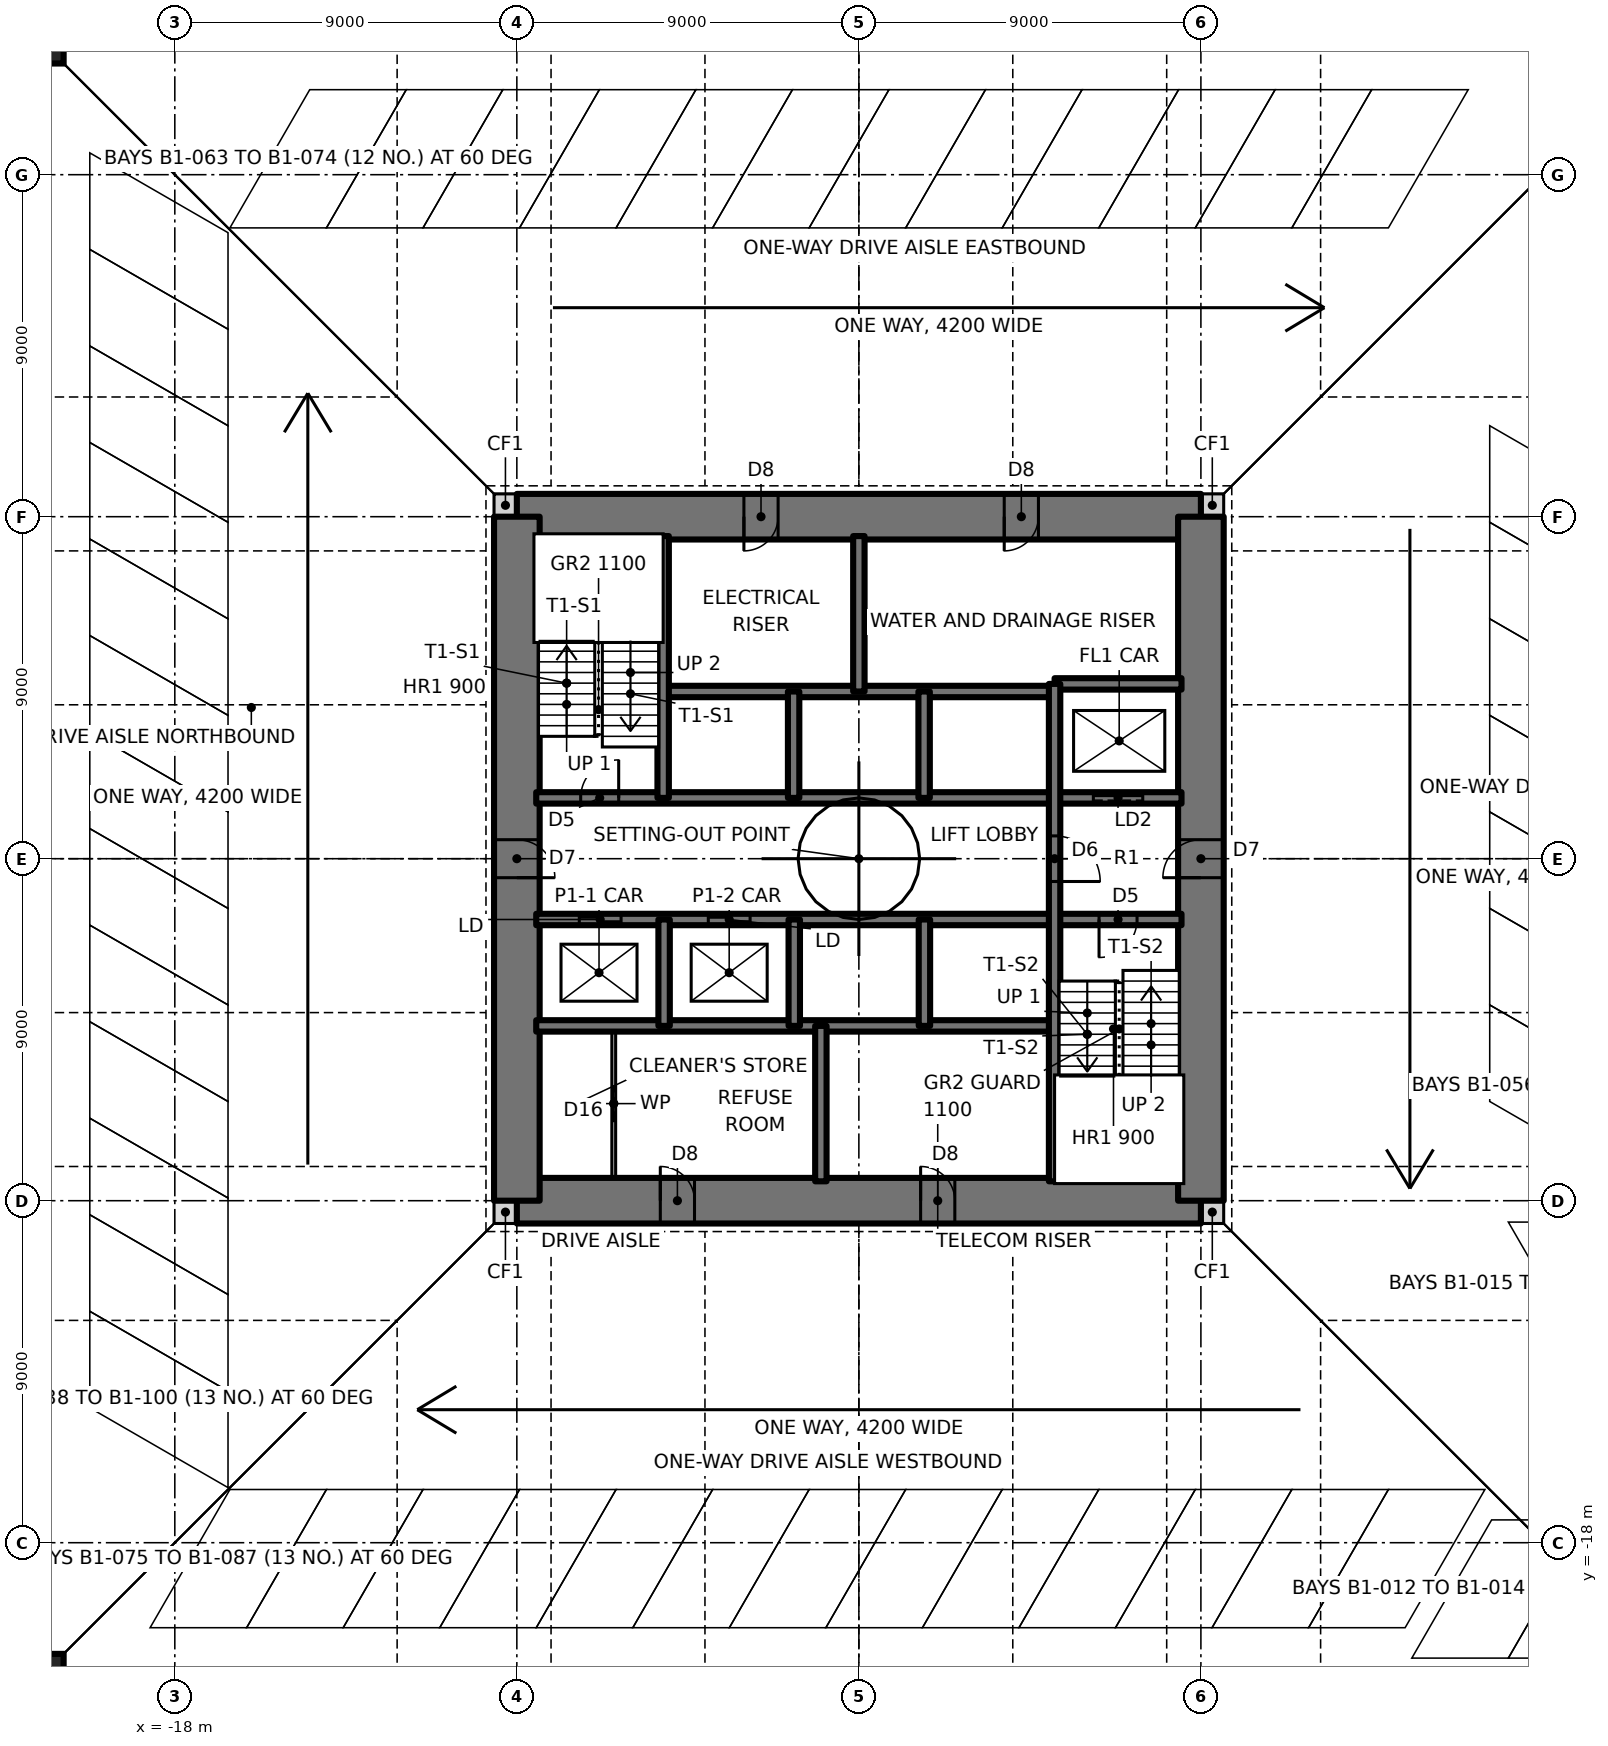
"""IFC4 building model, lengths in metres.
Left out: names, types, materials, properties, quantities, classifications, styles, units other than length and angle.
Written with IfcOpenShell. Run it as: python <this file> out.ifc"""

import sys

from ifc_helpers import new_model, si_unit, direction, frame, frame_2d, origin, origin_2d, place, context, subcontext, project, spatial, rectangle, hollow_rectangle, extrude, element, fill, save


model = new_model("IFC4")
c1 = context("Model", 3, precision=1e-05, world=origin(), true_north=direction((0.0, 1.0)))
c2 = subcontext(c1, "Body", "Model", "MODEL_VIEW")
j1 = project(units=[si_unit("LENGTHUNIT", "METRE"), si_unit("PLANEANGLEUNIT", "RADIAN")], contexts=[c1])
p1 = place(None, origin())
s1 = spatial("IfcSite", under=j1, at=p1, CompositionType="ELEMENT")
p2 = place(p1, origin())
s2 = spatial("IfcBuilding", under=s1, at=p2, CompositionType="ELEMENT")
p3 = place(p2, frame((0.0, 0.0, -3.6)))
s3 = spatial("IfcBuildingStorey", under=s2, at=p3, CompositionType="ELEMENT", Elevation=-3.6)
for number, where, z_axis, x_axis in (
    (1, (-21.326, -21.326, 0.0), (0.0, 0.0, 1.0), (1.0, 0.0, 0.0)),
    (2, (-21.326, 21.326, 0.0), (0.0, 0.0, 1.0), (1.0, 0.0, 0.0)),
):
    element("IfcColumn", number, at=place(p3, frame(where, z_axis=z_axis, x_axis=x_axis)), inside=s3, PredefinedType="COLUMN", context=c2, shape_type="SweptSolid", body=[
        extrude(hollow_rectangle(XDim=0.8, YDim=0.8, WallThickness=0.09, at=origin_2d()), origin(), (0.0, 0.0, 1.0), 3.6),
    ])
for number, where, z_axis, x_axis in (
    (3, (-9.6, -9.3, 0.0), (0.0, 0.0, 1.0), (1.0, 0.0, 0.0)),
    (4, (9.0, -9.3, 0.0), (0.0, 0.0, 1.0), (1.0, 0.0, 0.0)),
    (5, (9.0, 9.3, 0.0), (0.0, 0.0, 1.0), (1.0, 0.0, 0.0)),
    (6, (-9.6, 9.3, 0.0), (0.0, 0.0, 1.0), (1.0, 0.0, 0.0)),
):
    element("IfcWall", number, at=place(p3, frame(where, z_axis=z_axis, x_axis=x_axis)), inside=s3, PredefinedType="SOLIDWALL", context=c2, shape_type="SweptSolid", body=[
        extrude(rectangle(XDim=0.6, YDim=0.6, at=frame_2d((0.3, 0.0))), origin(), (0.0, 0.0, 1.0), 3.6),
    ])
p4 = place(p3, frame((-9.0, -9.0, 0.0), z_axis=(0.0, 0.0, 1.0), x_axis=(1.0, 0.0, 0.0)))
e7 = element("IfcWall", 7, at=p4, inside=s3, PredefinedType="SHEAR", context=c2, shape_type="SweptSolid", body=[
    extrude(rectangle(XDim=18.0, YDim=1.2, at=frame_2d((9.0, 0.0))), origin(), (0.0, 0.0, 1.0), 3.6),
])
p5 = place(p4, frame((3.775, 0.0, 0.0)))
e8 = element("IfcOpeningElement", 8, at=p5, cuts=e7, PredefinedType="OPENING", context=c2, shape_type="SweptSolid", body=[
    extrude(rectangle(XDim=0.9, YDim=2.1, at=frame_2d((0.45, 1.05))), frame((0.0, 0.61, 0.0), z_axis=(0.0, -1.0, 0.0), x_axis=(1.0, 0.0, 0.0)), (0.0, 0.0, 1.0), 1.22),
])
p6 = place(p4, frame((10.625, 0.0, 0.0)))
e9 = element("IfcOpeningElement", 9, at=p6, cuts=e7, PredefinedType="OPENING", context=c2, shape_type="SweptSolid", body=[
    extrude(rectangle(XDim=0.9, YDim=2.1, at=frame_2d((0.45, 1.05))), frame((0.0, 0.61, 0.0), z_axis=(0.0, -1.0, 0.0), x_axis=(1.0, 0.0, 0.0)), (0.0, 0.0, 1.0), 1.22),
])
p7 = place(p3, frame((9.0, 9.0, 0.0), z_axis=(0.0, 0.0, 1.0), x_axis=(-1.0, 0.0, 0.0)))
e10 = element("IfcWall", 10, at=p7, inside=s3, PredefinedType="SHEAR", context=c2, shape_type="SweptSolid", body=[
    extrude(rectangle(XDim=18.0, YDim=1.2, at=frame_2d((9.0, 0.0))), origin(), (0.0, 0.0, 1.0), 3.6),
])
p8 = place(p7, frame((11.125, 0.0, 0.0)))
e11 = element("IfcOpeningElement", 11, at=p8, cuts=e10, PredefinedType="OPENING", context=c2, shape_type="SweptSolid", body=[
    extrude(rectangle(XDim=0.9, YDim=2.1, at=frame_2d((0.45, 1.05))), frame((0.0, 0.61, 0.0), z_axis=(0.0, -1.0, 0.0), x_axis=(1.0, 0.0, 0.0)), (0.0, 0.0, 1.0), 1.22),
])
p9 = place(p7, frame((4.275, 0.0, 0.0)))
e12 = element("IfcOpeningElement", 12, at=p9, cuts=e10, PredefinedType="OPENING", context=c2, shape_type="SweptSolid", body=[
    extrude(rectangle(XDim=0.9, YDim=2.1, at=frame_2d((0.45, 1.05))), frame((0.0, 0.61, 0.0), z_axis=(0.0, -1.0, 0.0), x_axis=(1.0, 0.0, 0.0)), (0.0, 0.0, 1.0), 1.22),
])
p10 = place(p3, frame((9.0, -9.0, 0.0), z_axis=(0.0, 0.0, 1.0), x_axis=(0.0, 1.0, 0.0)))
e13 = element("IfcWall", 13, at=p10, inside=s3, PredefinedType="SHEAR", context=c2, shape_type="SweptSolid", body=[
    extrude(rectangle(XDim=18.0, YDim=1.2, at=frame_2d((9.0, 0.0))), origin(), (0.0, 0.0, 1.0), 3.6),
])
p11 = place(p10, frame((8.5, 0.0, 0.0)))
e14 = element("IfcOpeningElement", 14, at=p11, cuts=e13, PredefinedType="OPENING", context=c2, shape_type="SweptSolid", body=[
    extrude(rectangle(XDim=1.0, YDim=2.1, at=frame_2d((0.5, 1.05))), frame((0.0, 0.61, 0.0), z_axis=(0.0, -1.0, 0.0), x_axis=(1.0, 0.0, 0.0)), (0.0, 0.0, 1.0), 1.22),
])
p12 = place(p3, frame((-9.0, 9.0, 0.0), z_axis=(0.0, 0.0, 1.0), x_axis=(0.0, -1.0, 0.0)))
e15 = element("IfcWall", 15, at=p12, inside=s3, PredefinedType="SHEAR", context=c2, shape_type="SweptSolid", body=[
    extrude(rectangle(XDim=18.0, YDim=1.2, at=frame_2d((9.0, 0.0))), origin(), (0.0, 0.0, 1.0), 3.6),
])
p13 = place(p12, frame((8.5, 0.0, 0.0)))
e16 = element("IfcOpeningElement", 16, at=p13, cuts=e15, PredefinedType="OPENING", context=c2, shape_type="SweptSolid", body=[
    extrude(rectangle(XDim=1.0, YDim=2.1, at=frame_2d((0.5, 1.05))), frame((0.0, 0.61, 0.0), z_axis=(0.0, -1.0, 0.0), x_axis=(1.0, 0.0, 0.0)), (0.0, 0.0, 1.0), 1.22),
])
p14 = place(p3, frame((-8.49, -4.4, 0.0), z_axis=(0.0, 0.0, 1.0), x_axis=(1.0, 0.0, 0.0)))
e17 = element("IfcWall", 17, at=p14, inside=s3, PredefinedType="SOLIDWALL", context=c2, shape_type="SweptSolid", body=[
    extrude(rectangle(XDim=13.64, YDim=0.3, at=frame_2d((6.82, 0.0))), origin(), (0.0, 0.0, 1.0), 3.6),
])
p15 = place(p3, frame((-8.49, -1.6, 0.0), z_axis=(0.0, 0.0, 1.0), x_axis=(1.0, 0.0, 0.0)))
e18 = element("IfcWall", 18, at=p15, inside=s3, PredefinedType="SOLIDWALL", context=c2, shape_type="SweptSolid", body=[
    extrude(rectangle(XDim=16.98, YDim=0.3, at=frame_2d((8.49, 0.0))), origin(), (0.0, 0.0, 1.0), 3.6),
])
p16 = place(p15, frame((14.81, 0.0, 0.0)))
e19 = element("IfcOpeningElement", 19, at=p16, cuts=e18, PredefinedType="OPENING", context=c2, shape_type="SweptSolid", body=[
    extrude(rectangle(XDim=1.0, YDim=2.1, at=frame_2d((0.5, 1.05))), frame((0.0, 0.16, 0.0), z_axis=(0.0, -1.0, 0.0), x_axis=(1.0, 0.0, 0.0)), (0.0, 0.0, 1.0), 0.32),
])
p17 = place(p15, frame((1.133, 0.0, 0.0)))
e20 = element("IfcOpeningElement", 20, at=p17, cuts=e18, PredefinedType="OPENING", context=c2, shape_type="SweptSolid", body=[
    extrude(rectangle(XDim=1.1, YDim=2.1, at=frame_2d((0.55, 1.05))), frame((0.0, 0.16, 0.0), z_axis=(0.0, -1.0, 0.0), x_axis=(1.0, 0.0, 0.0)), (0.0, 0.0, 1.0), 0.32),
])
p18 = place(p15, frame((4.528, 0.0, 0.0)))
e21 = element("IfcOpeningElement", 21, at=p18, cuts=e18, PredefinedType="OPENING", context=c2, shape_type="SweptSolid", body=[
    extrude(rectangle(XDim=1.1, YDim=2.1, at=frame_2d((0.55, 1.05))), frame((0.0, 0.16, 0.0), z_axis=(0.0, -1.0, 0.0), x_axis=(1.0, 0.0, 0.0)), (0.0, 0.0, 1.0), 0.32),
])
p19 = place(p3, frame((-8.49, 1.6, 0.0), z_axis=(0.0, 0.0, 1.0), x_axis=(1.0, 0.0, 0.0)))
e22 = element("IfcWall", 22, at=p19, inside=s3, PredefinedType="SOLIDWALL", context=c2, shape_type="SweptSolid", body=[
    extrude(rectangle(XDim=16.98, YDim=0.3, at=frame_2d((8.49, 0.0))), origin(), (0.0, 0.0, 1.0), 3.6),
])
p20 = place(p19, frame((1.17, 0.0, 0.0)))
e23 = element("IfcOpeningElement", 23, at=p20, cuts=e22, PredefinedType="OPENING", context=c2, shape_type="SweptSolid", body=[
    extrude(rectangle(XDim=1.0, YDim=2.1, at=frame_2d((0.5, 1.05))), frame((0.0, 0.16, 0.0), z_axis=(0.0, -1.0, 0.0), x_axis=(1.0, 0.0, 0.0)), (0.0, 0.0, 1.0), 0.32),
])
p21 = place(p19, frame((14.66, 0.0, 0.0)))
e24 = element("IfcOpeningElement", 24, at=p21, cuts=e22, PredefinedType="OPENING", context=c2, shape_type="SweptSolid", body=[
    extrude(rectangle(XDim=1.3, YDim=2.1, at=frame_2d((0.65, 1.05))), frame((0.0, 0.16, 0.0), z_axis=(0.0, -1.0, 0.0), x_axis=(1.0, 0.0, 0.0)), (0.0, 0.0, 1.0), 0.32),
])
p22 = place(p3, frame((-5.15, 4.4, 0.0), z_axis=(0.0, 0.0, 1.0), x_axis=(1.0, 0.0, 0.0)))
e25 = element("IfcWall", 25, at=p22, inside=s3, PredefinedType="SOLIDWALL", context=c2, shape_type="SweptSolid", body=[
    extrude(rectangle(XDim=10.3, YDim=0.3, at=frame_2d((5.15, 0.0))), origin(), (0.0, 0.0, 1.0), 3.6),
])
p23 = place(p3, frame((5.15, 4.6, 0.0), z_axis=(0.0, 0.0, 1.0), x_axis=(1.0, 0.0, 0.0)))
e26 = element("IfcWall", 26, at=p23, inside=s3, PredefinedType="SOLIDWALL", context=c2, shape_type="SweptSolid", body=[
    extrude(rectangle(XDim=3.34, YDim=0.3, at=frame_2d((1.67, 0.0))), origin(), (0.0, 0.0, 1.0), 3.6),
])
p24 = place(p3, frame((5.15, -8.49, 0.0), z_axis=(0.0, 0.0, 1.0), x_axis=(0.0, 1.0, 0.0)))
e27 = element("IfcWall", 27, at=p24, inside=s3, PredefinedType="SOLIDWALL", context=c2, shape_type="SweptSolid", body=[
    extrude(rectangle(XDim=13.09, YDim=0.3, at=frame_2d((6.545, 0.0))), origin(), (0.0, 0.0, 1.0), 3.6),
])
p25 = place(p24, frame((7.89, 0.0, 0.0)))
e28 = element("IfcOpeningElement", 28, at=p25, cuts=e27, PredefinedType="OPENING", context=c2, shape_type="SweptSolid", body=[
    extrude(rectangle(XDim=1.2, YDim=2.1, at=frame_2d((0.6, 1.05))), frame((0.0, 0.16, 0.0), z_axis=(0.0, -1.0, 0.0), x_axis=(1.0, 0.0, 0.0)), (0.0, 0.0, 1.0), 0.32),
])
for number, where, z_axis, x_axis in (
    (29, (1.725, -4.4, 0.0), (0.0, 0.0, 1.0), (0.0, 1.0, 0.0)),
    (30, (1.717, 1.6, 0.0), (0.0, 0.0, 1.0), (0.0, 1.0, 0.0)),
):
    element("IfcWall", number, at=place(p3, frame(where, z_axis=z_axis, x_axis=x_axis)), inside=s3, PredefinedType="SOLIDWALL", context=c2, shape_type="SweptSolid", body=[
        extrude(rectangle(XDim=2.8, YDim=0.3, at=frame_2d((1.4, 0.0))), origin(), (0.0, 0.0, 1.0), 3.6),
    ])
for number, where, z_axis, x_axis in (
    (31, (0.0, 4.4, 0.0), (0.0, 0.0, 1.0), (0.0, 1.0, 0.0)),
    (32, (-1.0, -8.49, 0.0), (0.0, 0.0, 1.0), (0.0, 1.0, 0.0)),
):
    element("IfcWall", number, at=place(p3, frame(where, z_axis=z_axis, x_axis=x_axis)), inside=s3, PredefinedType="SOLIDWALL", context=c2, shape_type="SweptSolid", body=[
        extrude(rectangle(XDim=4.09, YDim=0.3, at=frame_2d((2.045, 0.0))), origin(), (0.0, 0.0, 1.0), 3.6),
    ])
for number, where, z_axis, x_axis in (
    (33, (-1.7, -4.4, 0.0), (0.0, 0.0, 1.0), (0.0, 1.0, 0.0)),
    (34, (-1.717, 1.6, 0.0), (0.0, 0.0, 1.0), (0.0, 1.0, 0.0)),
    (35, (-5.125, -4.4, 0.0), (0.0, 0.0, 1.0), (0.0, 1.0, 0.0)),
):
    element("IfcWall", number, at=place(p3, frame(where, z_axis=z_axis, x_axis=x_axis)), inside=s3, PredefinedType="SOLIDWALL", context=c2, shape_type="SweptSolid", body=[
        extrude(rectangle(XDim=2.8, YDim=0.3, at=frame_2d((1.4, 0.0))), origin(), (0.0, 0.0, 1.0), 3.6),
    ])
p26 = place(p3, frame((-5.15, 1.6, 0.0), z_axis=(0.0, 0.0, 1.0), x_axis=(0.0, 1.0, 0.0)))
e36 = element("IfcWall", 36, at=p26, inside=s3, PredefinedType="SOLIDWALL", context=c2, shape_type="SweptSolid", body=[
    extrude(rectangle(XDim=6.89, YDim=0.3, at=frame_2d((3.445, 0.0))), origin(), (0.0, 0.0, 1.0), 3.6),
])
p27 = place(p3, frame((-6.45, -8.49, 0.0), z_axis=(0.0, 0.0, 1.0), x_axis=(0.0, 1.0, 0.0)))
e37 = element("IfcWall", 37, at=p27, inside=s3, PredefinedType="PARTITIONING", context=c2, shape_type="SweptSolid", body=[
    extrude(rectangle(XDim=4.09, YDim=0.1, at=frame_2d((2.045, 0.0))), origin(), (0.0, 0.0, 1.0), 3.4),
])
p28 = place(p27, frame((1.595, 0.0, 0.0)))
e38 = element("IfcOpeningElement", 38, at=p28, cuts=e37, PredefinedType="OPENING", context=c2, shape_type="SweptSolid", body=[
    extrude(rectangle(XDim=0.9, YDim=2.1, at=frame_2d((0.45, 1.05))), frame((0.0, 0.06, 0.0), z_axis=(0.0, -1.0, 0.0), x_axis=(1.0, 0.0, 0.0)), (0.0, 0.0, 1.0), 0.12),
])
p29 = place(p20, origin())
e39 = element("IfcDoor", 39, at=p29, inside=s3, OperationType="SINGLE_SWING_RIGHT", PredefinedType="DOOR", context=c2, shape_type="SweptSolid", body=[
    extrude(rectangle(XDim=1.0, YDim=2.1, at=frame_2d((0.5, 1.05))), frame((0.0, 0.025, 0.0), z_axis=(0.0, -1.0, 0.0), x_axis=(1.0, 0.0, 0.0)), (0.0, 0.0, 1.0), 0.05),
])
fill(e23, e39)
p30 = place(p16, frame((1.0, 0.0, 0.0), z_axis=(0.0, 0.0, 1.0), x_axis=(-1.0, 0.0, 0.0)))
e40 = element("IfcDoor", 40, at=p30, inside=s3, OperationType="SINGLE_SWING_RIGHT", PredefinedType="DOOR", context=c2, shape_type="SweptSolid", body=[
    extrude(rectangle(XDim=1.0, YDim=2.1, at=frame_2d((0.5, 1.05))), frame((0.0, 0.025, 0.0), z_axis=(0.0, -1.0, 0.0), x_axis=(1.0, 0.0, 0.0)), (0.0, 0.0, 1.0), 0.05),
])
fill(e19, e40)
p31 = place(p25, frame((1.2, 0.0, 0.0), z_axis=(0.0, 0.0, 1.0), x_axis=(-1.0, 0.0, 0.0)))
e41 = element("IfcDoor", 41, at=p31, inside=s3, OperationType="SINGLE_SWING_RIGHT", PredefinedType="DOOR", context=c2, shape_type="SweptSolid", body=[
    extrude(rectangle(XDim=1.2, YDim=2.1, at=frame_2d((0.6, 1.05))), frame((0.0, 0.025, 0.0), z_axis=(0.0, -1.0, 0.0), x_axis=(1.0, 0.0, 0.0)), (0.0, 0.0, 1.0), 0.05),
])
fill(e28, e41)
p32 = place(p28, origin())
e42 = element("IfcDoor", 42, at=p32, inside=s3, OperationType="SLIDING_TO_LEFT", PredefinedType="DOOR", context=c2, shape_type="SweptSolid", body=[
    extrude(rectangle(XDim=0.9, YDim=2.1, at=frame_2d((0.45, 1.05))), frame((0.0, 0.025, 0.0), z_axis=(0.0, -1.0, 0.0), x_axis=(1.0, 0.0, 0.0)), (0.0, 0.0, 1.0), 0.05),
])
fill(e38, e42)
p33 = place(p13, origin())
e43 = element("IfcDoor", 43, at=p33, inside=s3, OperationType="SINGLE_SWING_RIGHT", PredefinedType="DOOR", context=c2, shape_type="SweptSolid", body=[
    extrude(rectangle(XDim=1.0, YDim=2.1, at=frame_2d((0.5, 1.05))), frame((0.0, 0.025, 0.0), z_axis=(0.0, -1.0, 0.0), x_axis=(1.0, 0.0, 0.0)), (0.0, 0.0, 1.0), 0.05),
])
fill(e16, e43)
p34 = place(p11, origin())
e44 = element("IfcDoor", 44, at=p34, inside=s3, OperationType="SINGLE_SWING_LEFT", PredefinedType="DOOR", context=c2, shape_type="SweptSolid", body=[
    extrude(rectangle(XDim=1.0, YDim=2.1, at=frame_2d((0.5, 1.05))), frame((0.0, 0.025, 0.0), z_axis=(0.0, -1.0, 0.0), x_axis=(1.0, 0.0, 0.0)), (0.0, 0.0, 1.0), 0.05),
])
fill(e14, e44)
p35 = place(p8, origin())
e45 = element("IfcDoor", 45, at=p35, inside=s3, OperationType="SINGLE_SWING_RIGHT", PredefinedType="DOOR", context=c2, shape_type="SweptSolid", body=[
    extrude(rectangle(XDim=0.9, YDim=2.1, at=frame_2d((0.45, 1.05))), frame((0.0, 0.025, 0.0), z_axis=(0.0, -1.0, 0.0), x_axis=(1.0, 0.0, 0.0)), (0.0, 0.0, 1.0), 0.05),
])
fill(e11, e45)
p36 = place(p9, origin())
e46 = element("IfcDoor", 46, at=p36, inside=s3, OperationType="SINGLE_SWING_RIGHT", PredefinedType="DOOR", context=c2, shape_type="SweptSolid", body=[
    extrude(rectangle(XDim=0.9, YDim=2.1, at=frame_2d((0.45, 1.05))), frame((0.0, 0.025, 0.0), z_axis=(0.0, -1.0, 0.0), x_axis=(1.0, 0.0, 0.0)), (0.0, 0.0, 1.0), 0.05),
])
fill(e12, e46)
p37 = place(p5, origin())
e47 = element("IfcDoor", 47, at=p37, inside=s3, OperationType="SINGLE_SWING_LEFT", PredefinedType="DOOR", context=c2, shape_type="SweptSolid", body=[
    extrude(rectangle(XDim=0.9, YDim=2.1, at=frame_2d((0.45, 1.05))), frame((0.0, 0.025, 0.0), z_axis=(0.0, -1.0, 0.0), x_axis=(1.0, 0.0, 0.0)), (0.0, 0.0, 1.0), 0.05),
])
fill(e8, e47)
p38 = place(p6, origin())
e48 = element("IfcDoor", 48, at=p38, inside=s3, OperationType="SINGLE_SWING_LEFT", PredefinedType="DOOR", context=c2, shape_type="SweptSolid", body=[
    extrude(rectangle(XDim=0.9, YDim=2.1, at=frame_2d((0.45, 1.05))), frame((0.0, 0.025, 0.0), z_axis=(0.0, -1.0, 0.0), x_axis=(1.0, 0.0, 0.0)), (0.0, 0.0, 1.0), 0.05),
])
fill(e9, e48)
p39 = place(p17, origin())
e49 = element("IfcDoor", 49, at=p39, inside=s3, OperationType="DOUBLE_DOOR_SLIDING", PredefinedType="DOOR", context=c2, shape_type="SweptSolid", body=[
    extrude(rectangle(XDim=1.1, YDim=2.1, at=frame_2d((0.55, 1.05))), frame((0.0, 0.025, 0.0), z_axis=(0.0, -1.0, 0.0), x_axis=(1.0, 0.0, 0.0)), (0.0, 0.0, 1.0), 0.05),
])
fill(e20, e49)
p40 = place(p18, origin())
e50 = element("IfcDoor", 50, at=p40, inside=s3, OperationType="DOUBLE_DOOR_SLIDING", PredefinedType="DOOR", context=c2, shape_type="SweptSolid", body=[
    extrude(rectangle(XDim=1.1, YDim=2.1, at=frame_2d((0.55, 1.05))), frame((0.0, 0.025, 0.0), z_axis=(0.0, -1.0, 0.0), x_axis=(1.0, 0.0, 0.0)), (0.0, 0.0, 1.0), 0.05),
])
fill(e21, e50)
p41 = place(p21, origin())
e51 = element("IfcDoor", 51, at=p41, inside=s3, OperationType="SLIDING_TO_LEFT", PredefinedType="DOOR", context=c2, shape_type="SweptSolid", body=[
    extrude(rectangle(XDim=1.3, YDim=2.1, at=frame_2d((0.65, 1.05))), frame((0.0, 0.025, 0.0), z_axis=(0.0, -1.0, 0.0), x_axis=(1.0, 0.0, 0.0)), (0.0, 0.0, 1.0), 0.05),
])
fill(e24, e51)
save(model, sys.argv[1])
